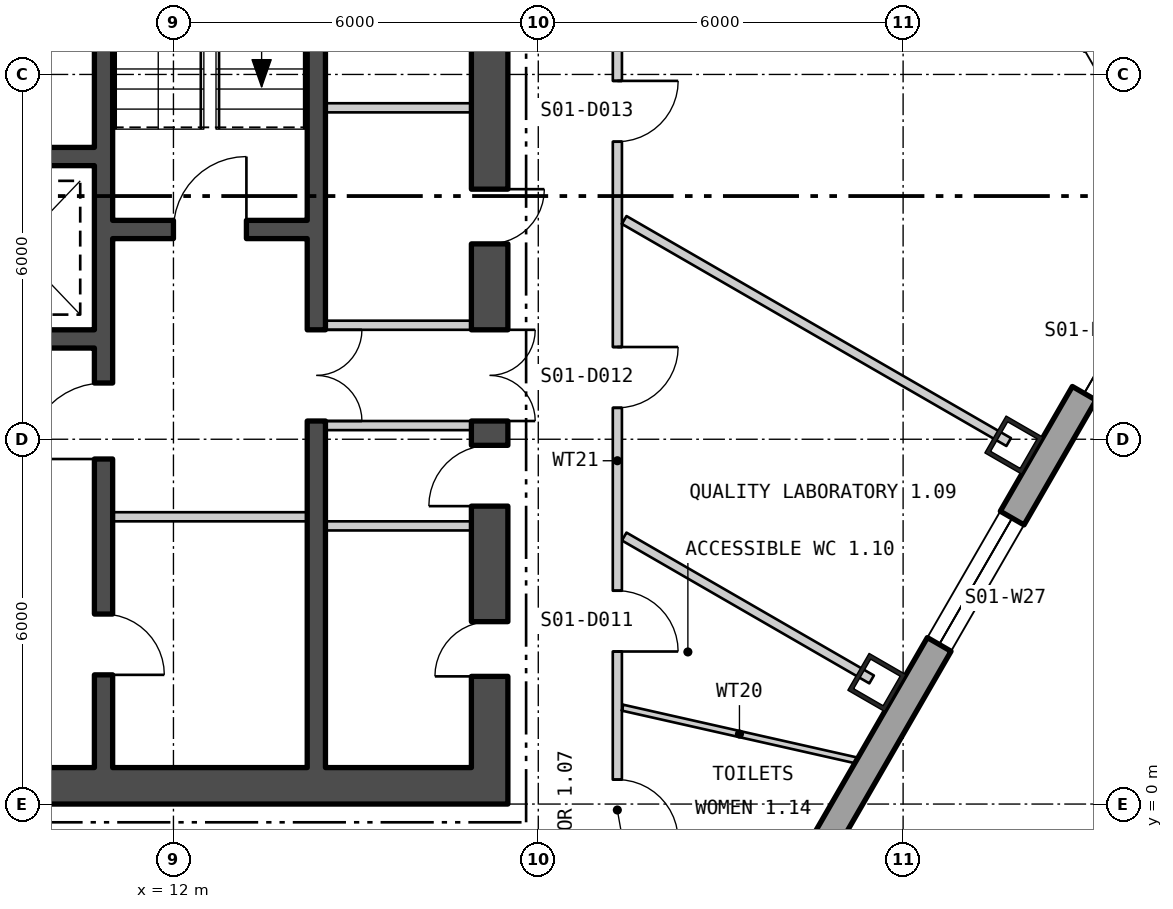
"""IFC4 building model, lengths in metres.
Left out: names, types, materials, properties, quantities, classifications, styles, units other than length and angle.
Written with IfcOpenShell. Run it as: python <this file> out.ifc"""

import sys

from ifc_helpers import new_model, si_unit, direction, frame, frame_2d, origin, origin_2d, place, context, subcontext, project, spatial, polyline, rectangle, hollow_rectangle, outline, extrude, element, fill, save


model = new_model("IFC4")
c1 = context("Model", 3, precision=1e-05, world=origin(), true_north=direction((0.0, 1.0)))
c2 = subcontext(c1, "Body", "Model", "MODEL_VIEW")
j1 = project(units=[si_unit("LENGTHUNIT", "METRE"), si_unit("PLANEANGLEUNIT", "RADIAN")], contexts=[c1])
p1 = place(None, origin())
s1 = spatial("IfcSite", under=j1, at=p1, CompositionType="ELEMENT")
p2 = place(p1, origin())
s2 = spatial("IfcBuilding", under=s1, at=p2, CompositionType="ELEMENT")
p3 = place(p2, frame((0.0, 0.0, 28.8)))
s3 = spatial("IfcBuildingStorey", under=s2, at=p3, CompositionType="ELEMENT", Elevation=28.8)
p4 = place(p3, frame((23.569, 2.0, 0.0), z_axis=(0.0, 0.0, 1.0), x_axis=(0.5, 0.866025403784, 0.0)))
e1 = element("IfcColumn", 1, at=p4, inside=s3, PredefinedType="COLUMN", context=c2, shape_type="SweptSolid", body=[
    extrude(hollow_rectangle(XDim=0.7, YDim=0.7, WallThickness=0.07, at=origin_2d()), origin(), (0.0, 0.0, 1.0), 4.5),
])
p5 = place(p3, frame((25.822, 5.904, -0.85), z_axis=(0.0, 0.0, 1.0), x_axis=(0.5, 0.866025403784, 0.0)))
e2 = element("IfcColumn", 2, at=p5, inside=s3, PredefinedType="COLUMN", context=c2, shape_type="SweptSolid", body=[
    extrude(hollow_rectangle(XDim=0.7, YDim=0.7, WallThickness=0.07, at=origin_2d()), origin(), (0.0, 0.0, 1.0), 5.35),
])
p6 = place(p3, frame((5.87, -29.805, -0.23), z_axis=(0.0, 0.0, 1.0), x_axis=(0.499999764979, 0.866025539474, 0.0)))
e3 = element("IfcWall", 3, at=p6, inside=s3, PredefinedType="SOLIDWALL", context=c2, shape_type="SweptSolid", body=[
    extrude(outline(polyline([(-0.13, -0.225), (45.87, -0.225), (45.61, 0.225), (0.13, 0.225), (-0.13, -0.225)])), origin(), (0.0, 0.0, 1.0), 4.55),
])
p7 = place(p6, frame((1.424, 0.0, 1.13)))
e4 = element("IfcOpeningElement", 4, at=p7, cuts=e3, PredefinedType="OPENING", context=c2, shape_type="SweptSolid", body=[
    extrude(rectangle(XDim=2.4, YDim=2.6, at=frame_2d((1.2, 1.3))), frame((0.0, 0.235, 0.0), z_axis=(0.0, -1.0, 0.0), x_axis=(1.0, 0.0, 0.0)), (0.0, 0.0, 1.0), 0.47),
])
p8 = place(p6, frame((5.893, 0.0, 1.13)))
e5 = element("IfcOpeningElement", 5, at=p8, cuts=e3, PredefinedType="OPENING", context=c2, shape_type="SweptSolid", body=[
    extrude(rectangle(XDim=2.4, YDim=2.6, at=frame_2d((1.2, 1.3))), frame((0.0, 0.235, 0.0), z_axis=(0.0, -1.0, 0.0), x_axis=(1.0, 0.0, 0.0)), (0.0, 0.0, 1.0), 0.47),
])
p9 = place(p6, frame((10.701, 0.0, 0.23)))
e6 = element("IfcOpeningElement", 6, at=p9, cuts=e3, PredefinedType="OPENING", context=c2, shape_type="SweptSolid", body=[
    extrude(rectangle(XDim=1.8, YDim=2.4, at=frame_2d((0.9, 1.2))), frame((0.0, 0.235, 0.0), z_axis=(0.0, -1.0, 0.0), x_axis=(1.0, 0.0, 0.0)), (0.0, 0.0, 1.0), 0.47),
])
p10 = place(p6, frame((14.909, 0.0, 1.13)))
e7 = element("IfcOpeningElement", 7, at=p10, cuts=e3, PredefinedType="OPENING", context=c2, shape_type="SweptSolid", body=[
    extrude(rectangle(XDim=2.4, YDim=2.6, at=frame_2d((1.2, 1.3))), frame((0.0, 0.235, 0.0), z_axis=(0.0, -1.0, 0.0), x_axis=(1.0, 0.0, 0.0)), (0.0, 0.0, 1.0), 0.47),
])
p11 = place(p6, frame((19.416, 0.0, 1.13)))
e8 = element("IfcOpeningElement", 8, at=p11, cuts=e3, PredefinedType="OPENING", context=c2, shape_type="SweptSolid", body=[
    extrude(rectangle(XDim=2.4, YDim=2.6, at=frame_2d((1.2, 1.3))), frame((0.0, 0.235, 0.0), z_axis=(0.0, -1.0, 0.0), x_axis=(1.0, 0.0, 0.0)), (0.0, 0.0, 1.0), 0.47),
])
p12 = place(p6, frame((23.924, 0.0, 1.13)))
e9 = element("IfcOpeningElement", 9, at=p12, cuts=e3, PredefinedType="OPENING", context=c2, shape_type="SweptSolid", body=[
    extrude(rectangle(XDim=2.4, YDim=2.6, at=frame_2d((1.2, 1.3))), frame((0.0, 0.235, 0.0), z_axis=(0.0, -1.0, 0.0), x_axis=(1.0, 0.0, 0.0)), (0.0, 0.0, 1.0), 0.47),
])
p13 = place(p6, frame((37.447, 0.0, 1.13)))
e10 = element("IfcOpeningElement", 10, at=p13, cuts=e3, PredefinedType="OPENING", context=c2, shape_type="SweptSolid", body=[
    extrude(rectangle(XDim=2.4, YDim=2.6, at=frame_2d((1.2, 1.3))), frame((0.0, 0.235, 0.0), z_axis=(0.0, -1.0, 0.0), x_axis=(1.0, 0.0, 0.0)), (0.0, 0.0, 1.0), 0.47),
])
p14 = place(p6, frame((42.216, 0.0, 0.23)))
e11 = element("IfcOpeningElement", 11, at=p14, cuts=e3, PredefinedType="OPENING", context=c2, shape_type="SweptSolid", body=[
    extrude(rectangle(XDim=1.8, YDim=2.4, at=frame_2d((0.9, 1.2))), frame((0.0, 0.235, 0.0), z_axis=(0.0, -1.0, 0.0), x_axis=(1.0, 0.0, 0.0)), (0.0, 0.0, 1.0), 0.47),
])
p15 = place(p3, frame((28.74, 9.808, -0.23), z_axis=(0.0, 0.0, 1.0), x_axis=(-0.500000422144, 0.866025160059, 0.0)))
e12 = element("IfcWall", 12, at=p15, inside=s3, PredefinedType="SOLIDWALL", context=c2, shape_type="SweptSolid", body=[
    extrude(outline(polyline([(-0.13, -0.225), (11.87, -0.225), (11.61, 0.225), (0.13, 0.225), (-0.13, -0.225)])), origin(), (0.0, 0.0, 1.0), 4.33),
])
p16 = place(p15, frame((1.316, 0.0, 1.13)))
e13 = element("IfcOpeningElement", 13, at=p16, cuts=e12, PredefinedType="OPENING", context=c2, shape_type="SweptSolid", body=[
    extrude(rectangle(XDim=1.8, YDim=2.6, at=frame_2d((0.9, 1.3))), frame((0.0, 0.235, 0.0), z_axis=(0.0, -1.0, 0.0), x_axis=(1.0, 0.0, 0.0)), (0.0, 0.0, 1.0), 0.47),
])
p17 = place(p15, frame((4.97, 0.0, 0.23)))
e14 = element("IfcOpeningElement", 14, at=p17, cuts=e12, PredefinedType="OPENING", context=c2, shape_type="SweptSolid", body=[
    extrude(rectangle(XDim=1.8, YDim=2.4, at=frame_2d((0.9, 1.2))), frame((0.0, 0.235, 0.0), z_axis=(0.0, -1.0, 0.0), x_axis=(1.0, 0.0, 0.0)), (0.0, 0.0, 1.0), 0.47),
])
p18 = place(p15, frame((8.624, 0.0, 1.13)))
e15 = element("IfcOpeningElement", 15, at=p18, cuts=e12, PredefinedType="OPENING", context=c2, shape_type="SweptSolid", body=[
    extrude(rectangle(XDim=1.8, YDim=2.6, at=frame_2d((0.9, 1.3))), frame((0.0, 0.235, 0.0), z_axis=(0.0, -1.0, 0.0), x_axis=(1.0, 0.0, 0.0)), (0.0, 0.0, 1.0), 0.47),
])
p19 = place(p3, frame((-17.5, 0.3, 0.0), z_axis=(0.0, 0.0, 1.0), x_axis=(1.0, 0.0, 0.0)))
e16 = element("IfcWall", 16, at=p19, inside=s3, PredefinedType="SHEAR", context=c2, shape_type="SweptSolid", body=[
    extrude(rectangle(XDim=35.0, YDim=0.6, at=frame_2d((17.5, 0.0))), origin(), (0.0, 0.0, 1.0), 4.3),
])
p20 = place(p19, frame((12.0, 0.0, 0.0)))
e17 = element("IfcOpeningElement", 17, at=p20, cuts=e16, PredefinedType="OPENING", context=c2, shape_type="SweptSolid", body=[
    extrude(rectangle(XDim=1.8, YDim=2.4, at=frame_2d((0.9, 1.2))), frame((0.0, 0.31, 0.0), z_axis=(0.0, -1.0, 0.0), x_axis=(1.0, 0.0, 0.0)), (0.0, 0.0, 1.0), 0.62),
])
p21 = place(p19, frame((22.0, 0.0, 0.0)))
e18 = element("IfcOpeningElement", 18, at=p21, cuts=e16, PredefinedType="OPENING", context=c2, shape_type="SweptSolid", body=[
    extrude(rectangle(XDim=1.8, YDim=2.4, at=frame_2d((0.9, 1.2))), frame((0.0, 0.31, 0.0), z_axis=(0.0, -1.0, 0.0), x_axis=(1.0, 0.0, 0.0)), (0.0, 0.0, 1.0), 0.62),
])
p22 = place(p3, frame((17.2, 0.6, 0.0), z_axis=(0.0, 0.0, 1.0), x_axis=(0.0, 1.0, 0.0)))
e19 = element("IfcWall", 19, at=p22, inside=s3, PredefinedType="SHEAR", context=c2, shape_type="SweptSolid", body=[
    extrude(rectangle(XDim=16.8, YDim=0.6, at=frame_2d((8.4, 0.0))), origin(), (0.0, 0.0, 1.0), 4.3),
])
p23 = place(p22, frame((5.7, 0.0, 0.0)))
e20 = element("IfcOpeningElement", 20, at=p23, cuts=e19, PredefinedType="OPENING", context=c2, shape_type="SweptSolid", body=[
    extrude(rectangle(XDim=1.5, YDim=2.1, at=frame_2d((0.75, 1.05))), frame((0.0, 0.31, 0.0), z_axis=(0.0, -1.0, 0.0), x_axis=(1.0, 0.0, 0.0)), (0.0, 0.0, 1.0), 0.62),
])
p24 = place(p22, frame((1.5, 0.0, 0.0)))
e21 = element("IfcOpeningElement", 21, at=p24, cuts=e19, PredefinedType="OPENING", context=c2, shape_type="SweptSolid", body=[
    extrude(rectangle(XDim=0.9, YDim=2.1, at=frame_2d((0.45, 1.05))), frame((0.0, 0.31, 0.0), z_axis=(0.0, -1.0, 0.0), x_axis=(1.0, 0.0, 0.0)), (0.0, 0.0, 1.0), 0.62),
])
p25 = place(p22, frame((4.3, 0.0, 0.0)))
e22 = element("IfcOpeningElement", 22, at=p25, cuts=e19, PredefinedType="OPENING", context=c2, shape_type="SweptSolid", body=[
    extrude(rectangle(XDim=1.0, YDim=2.1, at=frame_2d((0.5, 1.05))), frame((0.0, 0.31, 0.0), z_axis=(0.0, -1.0, 0.0), x_axis=(1.0, 0.0, 0.0)), (0.0, 0.0, 1.0), 0.62),
])
p26 = place(p22, frame((8.613, 0.0, 0.0)))
e23 = element("IfcOpeningElement", 23, at=p26, cuts=e19, PredefinedType="OPENING", context=c2, shape_type="SweptSolid", body=[
    extrude(rectangle(XDim=0.9, YDim=2.1, at=frame_2d((0.45, 1.05))), frame((0.0, 0.31, 0.0), z_axis=(0.0, -1.0, 0.0), x_axis=(1.0, 0.0, 0.0)), (0.0, 0.0, 1.0), 0.62),
])
p27 = place(p22, frame((13.413, 0.0, 0.0)))
e24 = element("IfcOpeningElement", 24, at=p27, cuts=e19, PredefinedType="OPENING", context=c2, shape_type="SweptSolid", body=[
    extrude(rectangle(XDim=0.9, YDim=2.1, at=frame_2d((0.45, 1.05))), frame((0.0, 0.31, 0.0), z_axis=(0.0, -1.0, 0.0), x_axis=(1.0, 0.0, 0.0)), (0.0, 0.0, 1.0), 0.62),
])
p28 = place(p3, frame((10.85, 0.6, 0.0), z_axis=(0.0, 0.0, 1.0), x_axis=(0.0, 1.0, 0.0)))
e25 = element("IfcWall", 25, at=p28, inside=s3, PredefinedType="SHEAR", context=c2, shape_type="SweptSolid", body=[
    extrude(rectangle(XDim=16.8, YDim=0.3, at=frame_2d((8.4, 0.0))), origin(), (0.0, 0.0, 1.0), 4.3),
])
p29 = place(p28, frame((5.075, 0.0, 0.0)))
e26 = element("IfcOpeningElement", 26, at=p29, cuts=e25, PredefinedType="OPENING", context=c2, shape_type="SweptSolid", body=[
    extrude(rectangle(XDim=1.25, YDim=2.1, at=frame_2d((0.625, 1.05))), frame((0.0, 0.16, 0.0), z_axis=(0.0, -1.0, 0.0), x_axis=(1.0, 0.0, 0.0)), (0.0, 0.0, 1.0), 0.32),
])
p30 = place(p28, frame((1.525, 0.0, 0.0)))
e27 = element("IfcOpeningElement", 27, at=p30, cuts=e25, PredefinedType="OPENING", context=c2, shape_type="SweptSolid", body=[
    extrude(rectangle(XDim=1.0, YDim=2.1, at=frame_2d((0.5, 1.05))), frame((0.0, 0.16, 0.0), z_axis=(0.0, -1.0, 0.0), x_axis=(1.0, 0.0, 0.0)), (0.0, 0.0, 1.0), 0.32),
])
p31 = place(p3, frame((14.35, 0.6, 0.0), z_axis=(0.0, 0.0, 1.0), x_axis=(0.0, 1.0, 0.0)))
e28 = element("IfcWall", 28, at=p31, inside=s3, PredefinedType="SHEAR", context=c2, shape_type="SweptSolid", body=[
    extrude(rectangle(XDim=16.8, YDim=0.3, at=frame_2d((8.4, 0.0))), origin(), (0.0, 0.0, 1.0), 4.3),
])
p32 = place(p31, frame((5.7, 0.0, 0.0)))
e29 = element("IfcOpeningElement", 29, at=p32, cuts=e28, PredefinedType="OPENING", context=c2, shape_type="SweptSolid", body=[
    extrude(rectangle(XDim=1.5, YDim=2.1, at=frame_2d((0.75, 1.05))), frame((0.0, 0.16, 0.0), z_axis=(0.0, -1.0, 0.0), x_axis=(1.0, 0.0, 0.0)), (0.0, 0.0, 1.0), 0.32),
])
p33 = place(p3, frame((11.0, 9.45, 0.0), z_axis=(0.0, 0.0, 1.0), x_axis=(1.0, 0.0, 0.0)))
e30 = element("IfcWall", 30, at=p33, inside=s3, PredefinedType="SHEAR", context=c2, shape_type="SweptSolid", body=[
    extrude(rectangle(XDim=3.2, YDim=0.3, at=frame_2d((1.6, 0.0))), origin(), (0.0, 0.0, 1.0), 4.3),
])
p34 = place(p33, frame((1.0, 0.0, 0.0)))
e31 = element("IfcOpeningElement", 31, at=p34, cuts=e30, PredefinedType="OPENING", context=c2, shape_type="SweptSolid", body=[
    extrude(rectangle(XDim=1.2, YDim=2.1, at=frame_2d((0.6, 1.05))), frame((0.0, 0.16, 0.0), z_axis=(0.0, -1.0, 0.0), x_axis=(1.0, 0.0, 0.0)), (0.0, 0.0, 1.0), 0.32),
])
for number, where, z_axis, x_axis in (
    (32, (2.6, 10.65, 0.0), (0.0, 0.0, 1.0), (1.0, 0.0, 0.0)),
    (33, (2.6, 7.65, 0.0), (0.0, 0.0, 1.0), (1.0, 0.0, 0.0)),
):
    element("IfcWall", number, at=place(p3, frame(where, z_axis=z_axis, x_axis=x_axis)), inside=s3, PredefinedType="SHEAR", context=c2, shape_type="SweptSolid", body=[
        extrude(rectangle(XDim=8.1, YDim=0.3, at=frame_2d((4.05, 0.0))), origin(), (0.0, 0.0, 1.0), 4.3),
    ])
p35 = place(p3, frame((11.0, 4.725, 0.0), z_axis=(0.0, 0.0, 1.0), x_axis=(1.0, 0.0, 0.0)))
e34 = element("IfcWall", 34, at=p35, inside=s3, PredefinedType="PARTITIONING", context=c2, shape_type="SweptSolid", body=[
    extrude(rectangle(XDim=3.2, YDim=0.15, at=frame_2d((1.6, 0.0))), origin(), (0.0, 0.0, 1.0), 4.3),
])
for number, where, z_axis, x_axis in (
    (35, (14.5, 6.225, 0.0), (0.0, 0.0, 1.0), (1.0, 0.0, 0.0)),
    (36, (14.5, 7.875, 0.0), (0.0, 0.0, 1.0), (1.0, 0.0, 0.0)),
    (37, (14.5, 4.575, 0.0), (0.0, 0.0, 1.0), (1.0, 0.0, 0.0)),
    (38, (14.5, 11.451, 0.0), (0.0, 0.0, 1.0), (1.0, 0.0, 0.0)),
):
    element("IfcWall", number, at=place(p3, frame(where, z_axis=z_axis, x_axis=x_axis)), inside=s3, PredefinedType="PARTITIONING", context=c2, shape_type="SweptSolid", body=[
        extrude(rectangle(XDim=2.4, YDim=0.15, at=frame_2d((1.2, 0.0))), origin(), (0.0, 0.0, 1.0), 4.3),
    ])
p36 = place(p3, frame((19.3, -1.875, 0.0), z_axis=(0.0, 0.0, 1.0), x_axis=(6.6476102e-05, 0.99999999779, 0.0)))
e39 = element("IfcWall", 39, at=p36, inside=s3, PredefinedType="PARTITIONING", context=c2, shape_type="SweptSolid", body=[
    extrude(rectangle(XDim=15.043, YDim=0.15, at=frame_2d((7.521, 0.0))), origin(), (0.0, 0.0, 1.0), 4.3),
])
p37 = place(p36, frame((1.277, 0.0, 0.0)))
e40 = element("IfcOpeningElement", 40, at=p37, cuts=e39, PredefinedType="OPENING", context=c2, shape_type="SweptSolid", body=[
    extrude(rectangle(XDim=1.0, YDim=2.1, at=frame_2d((0.5, 1.05))), frame((0.0, 0.085, 0.0), z_axis=(0.0, -1.0, 0.0), x_axis=(1.0, 0.0, 0.0)), (0.0, 0.0, 1.0), 0.17),
])
p38 = place(p36, frame((4.384, 0.0, 0.0)))
e41 = element("IfcOpeningElement", 41, at=p38, cuts=e39, PredefinedType="OPENING", context=c2, shape_type="SweptSolid", body=[
    extrude(rectangle(XDim=1.0, YDim=2.1, at=frame_2d((0.5, 1.05))), frame((0.0, 0.085, 0.0), z_axis=(0.0, -1.0, 0.0), x_axis=(1.0, 0.0, 0.0)), (0.0, 0.0, 1.0), 0.17),
])
p39 = place(p36, frame((8.392, 0.0, 0.0)))
e42 = element("IfcOpeningElement", 42, at=p39, cuts=e39, PredefinedType="OPENING", context=c2, shape_type="SweptSolid", body=[
    extrude(rectangle(XDim=1.0, YDim=2.1, at=frame_2d((0.5, 1.05))), frame((0.0, 0.085, 0.0), z_axis=(0.0, -1.0, 0.0), x_axis=(1.0, 0.0, 0.0)), (0.0, 0.0, 1.0), 0.17),
])
p40 = place(p36, frame((12.769, 0.0, 0.0)))
e43 = element("IfcOpeningElement", 43, at=p40, cuts=e39, PredefinedType="OPENING", context=c2, shape_type="SweptSolid", body=[
    extrude(rectangle(XDim=1.0, YDim=2.1, at=frame_2d((0.5, 1.05))), frame((0.0, 0.085, 0.0), z_axis=(0.0, -1.0, 0.0), x_axis=(1.0, 0.0, 0.0)), (0.0, 0.0, 1.0), 0.17),
])
p41 = place(p3, frame((19.386, 1.585, 0.0), z_axis=(0.0, 0.0, 1.0), x_axis=(0.975507775366, -0.219964952209, 0.0)))
e44 = element("IfcWall", 44, at=p41, inside=s3, PredefinedType="PARTITIONING", context=c2, shape_type="SweptSolid", body=[
    extrude(rectangle(XDim=3.942, YDim=0.1, at=frame_2d((1.971, 0.0))), origin(), (0.0, 0.0, 1.0), 4.3),
])
p42 = place(p3, frame((19.413, 4.4, 0.0), z_axis=(0.0, 0.0, 1.0), x_axis=(0.865955197451, -0.500121581226, 0.0)))
e45 = element("IfcWall", 45, at=p42, inside=s3, PredefinedType="PARTITIONING", context=c2, shape_type="SweptSolid", body=[
    extrude(rectangle(XDim=4.699, YDim=0.15, at=frame_2d((2.349, 0.0))), origin(), (0.0, 0.0, 1.0), 4.3),
])
p43 = place(p3, frame((19.413, 9.606, 0.0), z_axis=(0.0, 0.0, 1.0), x_axis=(0.865941524513, -0.500145255025, 0.0)))
e46 = element("IfcWall", 46, at=p43, inside=s3, PredefinedType="PARTITIONING", context=c2, shape_type="SweptSolid", body=[
    extrude(rectangle(XDim=7.302, YDim=0.15, at=frame_2d((3.651, 0.0))), origin(), (0.0, 0.0, 1.0), 4.3),
])
p44 = place(p13, origin())
e47 = element("IfcWindow", 47, at=p44, inside=s3, PartitioningType="SINGLE_PANEL", PredefinedType="WINDOW", context=c2, shape_type="SweptSolid", body=[
    extrude(rectangle(XDim=2.4, YDim=2.6, at=frame_2d((1.2, 1.3))), frame((0.0, 0.105, 0.0), z_axis=(0.0, -1.0, 0.0), x_axis=(1.0, 0.0, 0.0)), (0.0, 0.0, 1.0), 0.06),
])
fill(e10, e47)
p45 = place(p14, frame((1.8, 0.0, 0.0), z_axis=(0.0, 0.0, 1.0), x_axis=(-1.0, 0.0, 0.0)))
e48 = element("IfcDoor", 48, at=p45, inside=s3, OperationType="DOUBLE_DOOR_SINGLE_SWING", PredefinedType="DOOR", context=c2, shape_type="SweptSolid", body=[
    extrude(rectangle(XDim=1.8, YDim=2.4, at=frame_2d((0.9, 1.2))), frame((0.0, 0.025, 0.0), z_axis=(0.0, -1.0, 0.0), x_axis=(1.0, 0.0, 0.0)), (0.0, 0.0, 1.0), 0.05),
])
fill(e11, e48)
p46 = place(p16, origin())
e49 = element("IfcWindow", 49, at=p46, inside=s3, PartitioningType="SINGLE_PANEL", PredefinedType="WINDOW", context=c2, shape_type="SweptSolid", body=[
    extrude(rectangle(XDim=1.8, YDim=2.6, at=frame_2d((0.9, 1.3))), frame((0.0, 0.105, 0.0), z_axis=(0.0, -1.0, 0.0), x_axis=(1.0, 0.0, 0.0)), (0.0, 0.0, 1.0), 0.06),
])
fill(e13, e49)
p47 = place(p34, origin())
e50 = element("IfcDoor", 50, at=p47, inside=s3, OperationType="SINGLE_SWING_LEFT", PredefinedType="DOOR", context=c2, shape_type="SweptSolid", body=[
    extrude(rectangle(XDim=1.2, YDim=2.1, at=frame_2d((0.6, 1.05))), frame((0.0, 0.025, 0.0), z_axis=(0.0, -1.0, 0.0), x_axis=(1.0, 0.0, 0.0)), (0.0, 0.0, 1.0), 0.05),
])
fill(e31, e50)
p48 = place(p29, origin())
e51 = element("IfcDoor", 51, at=p48, inside=s3, OperationType="SINGLE_SWING_RIGHT", PredefinedType="DOOR", context=c2, shape_type="SweptSolid", body=[
    extrude(rectangle(XDim=1.25, YDim=2.1, at=frame_2d((0.625, 1.05))), frame((0.0, 0.025, 0.0), z_axis=(0.0, -1.0, 0.0), x_axis=(1.0, 0.0, 0.0)), (0.0, 0.0, 1.0), 0.05),
])
fill(e26, e51)
p49 = place(p30, origin())
e52 = element("IfcDoor", 52, at=p49, inside=s3, OperationType="SINGLE_SWING_LEFT", PredefinedType="DOOR", context=c2, shape_type="SweptSolid", body=[
    extrude(rectangle(XDim=1.0, YDim=2.1, at=frame_2d((0.5, 1.05))), frame((0.0, 0.025, 0.0), z_axis=(0.0, -1.0, 0.0), x_axis=(1.0, 0.0, 0.0)), (0.0, 0.0, 1.0), 0.05),
])
fill(e27, e52)
p50 = place(p32, origin())
e53 = element("IfcDoor", 53, at=p50, inside=s3, OperationType="DOUBLE_DOOR_SINGLE_SWING", PredefinedType="DOOR", context=c2, shape_type="SweptSolid", body=[
    extrude(rectangle(XDim=1.5, YDim=2.1, at=frame_2d((0.75, 1.05))), frame((0.0, 0.025, 0.0), z_axis=(0.0, -1.0, 0.0), x_axis=(1.0, 0.0, 0.0)), (0.0, 0.0, 1.0), 0.05),
])
fill(e29, e53)
p51 = place(p23, origin())
e54 = element("IfcDoor", 54, at=p51, inside=s3, OperationType="DOUBLE_DOOR_SINGLE_SWING", PredefinedType="DOOR", context=c2, shape_type="SweptSolid", body=[
    extrude(rectangle(XDim=1.5, YDim=2.1, at=frame_2d((0.75, 1.05))), frame((0.0, 0.025, 0.0), z_axis=(0.0, -1.0, 0.0), x_axis=(1.0, 0.0, 0.0)), (0.0, 0.0, 1.0), 0.05),
])
fill(e20, e54)
p52 = place(p24, origin())
e55 = element("IfcDoor", 55, at=p52, inside=s3, OperationType="SINGLE_SWING_RIGHT", PredefinedType="DOOR", context=c2, shape_type="SweptSolid", body=[
    extrude(rectangle(XDim=0.9, YDim=2.1, at=frame_2d((0.45, 1.05))), frame((0.0, 0.025, 0.0), z_axis=(0.0, -1.0, 0.0), x_axis=(1.0, 0.0, 0.0)), (0.0, 0.0, 1.0), 0.05),
])
fill(e21, e55)
p53 = place(p25, origin())
e56 = element("IfcDoor", 56, at=p53, inside=s3, OperationType="SINGLE_SWING_RIGHT", PredefinedType="DOOR", context=c2, shape_type="SweptSolid", body=[
    extrude(rectangle(XDim=1.0, YDim=2.1, at=frame_2d((0.5, 1.05))), frame((0.0, 0.025, 0.0), z_axis=(0.0, -1.0, 0.0), x_axis=(1.0, 0.0, 0.0)), (0.0, 0.0, 1.0), 0.05),
])
fill(e22, e56)
p54 = place(p26, origin())
e57 = element("IfcDoor", 57, at=p54, inside=s3, OperationType="SINGLE_SWING_RIGHT", PredefinedType="DOOR", context=c2, shape_type="SweptSolid", body=[
    extrude(rectangle(XDim=0.9, YDim=2.1, at=frame_2d((0.45, 1.05))), frame((0.0, 0.025, 0.0), z_axis=(0.0, -1.0, 0.0), x_axis=(1.0, 0.0, 0.0)), (0.0, 0.0, 1.0), 0.05),
])
fill(e23, e57)
p55 = place(p37, origin())
e58 = element("IfcDoor", 58, at=p55, inside=s3, OperationType="SINGLE_SWING_LEFT", PredefinedType="DOOR", context=c2, shape_type="SweptSolid", body=[
    extrude(rectangle(XDim=1.0, YDim=2.1, at=frame_2d((0.5, 1.05))), frame((0.0, 0.025, 0.0), z_axis=(0.0, -1.0, 0.0), x_axis=(1.0, 0.0, 0.0)), (0.0, 0.0, 1.0), 0.05),
])
fill(e40, e58)
p56 = place(p38, origin())
e59 = element("IfcDoor", 59, at=p56, inside=s3, OperationType="SINGLE_SWING_LEFT", PredefinedType="DOOR", context=c2, shape_type="SweptSolid", body=[
    extrude(rectangle(XDim=1.0, YDim=2.1, at=frame_2d((0.5, 1.05))), frame((0.0, 0.025, 0.0), z_axis=(0.0, -1.0, 0.0), x_axis=(1.0, 0.0, 0.0)), (0.0, 0.0, 1.0), 0.05),
])
fill(e41, e59)
p57 = place(p39, origin())
e60 = element("IfcDoor", 60, at=p57, inside=s3, OperationType="SINGLE_SWING_RIGHT", PredefinedType="DOOR", context=c2, shape_type="SweptSolid", body=[
    extrude(rectangle(XDim=1.0, YDim=2.1, at=frame_2d((0.5, 1.05))), frame((0.0, 0.025, 0.0), z_axis=(0.0, -1.0, 0.0), x_axis=(1.0, 0.0, 0.0)), (0.0, 0.0, 1.0), 0.05),
])
fill(e42, e60)
p58 = place(p40, origin())
e61 = element("IfcDoor", 61, at=p58, inside=s3, OperationType="SINGLE_SWING_RIGHT", PredefinedType="DOOR", context=c2, shape_type="SweptSolid", body=[
    extrude(rectangle(XDim=1.0, YDim=2.1, at=frame_2d((0.5, 1.05))), frame((0.0, 0.025, 0.0), z_axis=(0.0, -1.0, 0.0), x_axis=(1.0, 0.0, 0.0)), (0.0, 0.0, 1.0), 0.05),
])
fill(e43, e61)
save(model, sys.argv[1])
